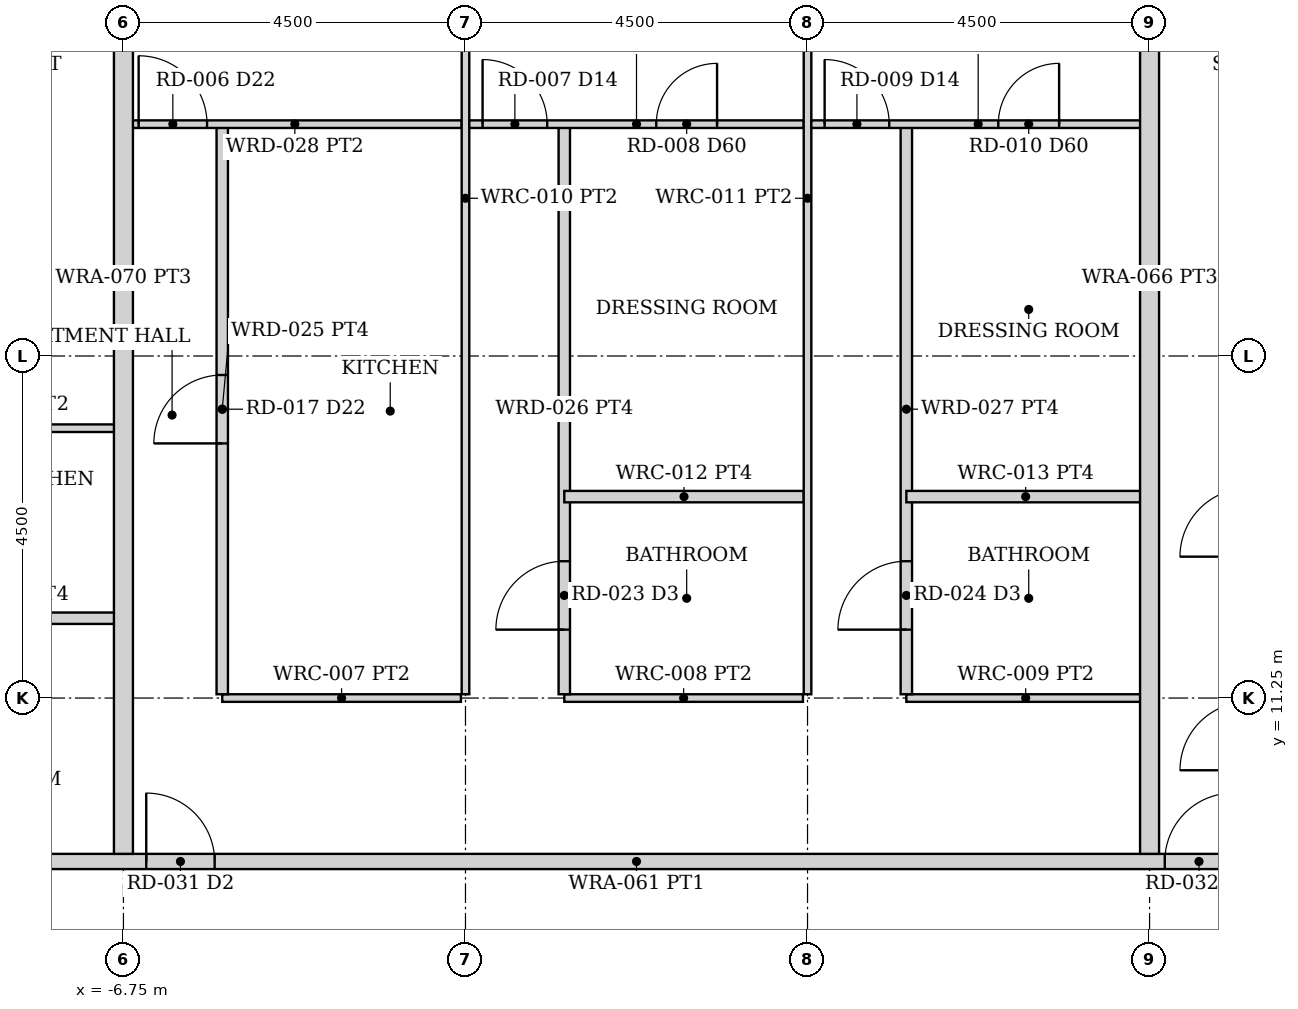
"""IFC4 building model, lengths in metres.
Left out: names, types, materials, properties, quantities, classifications, styles, units other than length and angle.
Written with IfcOpenShell. Run it as: python <this file> out.ifc"""

import sys

from ifc_helpers import new_model, si_unit, direction, frame, frame_2d, origin, place, context, subcontext, project, spatial, rectangle, extrude, element, fill, save


model = new_model("IFC4")
c1 = context("Model", 3, precision=1e-05, world=origin(), true_north=direction((0.0, 1.0)))
c2 = subcontext(c1, "Body", "Model", "MODEL_VIEW")
j1 = project(units=[si_unit("LENGTHUNIT", "METRE"), si_unit("PLANEANGLEUNIT", "RADIAN")], contexts=[c1])
p1 = place(None, origin())
s1 = spatial("IfcSite", under=j1, at=p1, CompositionType="ELEMENT")
p2 = place(p1, origin())
s2 = spatial("IfcBuilding", under=s1, at=p2, CompositionType="ELEMENT")
p3 = place(p2, frame((0.0, 0.0, 58.0)))
s3 = spatial("IfcBuildingStorey", under=s2, at=p3, CompositionType="ELEMENT", Elevation=58.0)
p4 = place(p3, frame((-24.55, 9.1, 0.0), z_axis=(0.0, 0.0, 1.0), x_axis=(1.0, 0.0, 0.0)))
e1 = element("IfcWall", 1, at=p4, inside=s3, PredefinedType="PARTITIONING", context=c2, shape_type="SweptSolid", body=[
    extrude(rectangle(XDim=49.1, YDim=0.2, at=frame_2d((24.55, 0.0))), origin(), (0.0, 0.0, 1.0), 2.373),
])
p5 = place(p4, frame((5.1, 0.0, 0.0)))
e2 = element("IfcOpeningElement", 2, at=p5, cuts=e1, PredefinedType="OPENING", context=c2, shape_type="SweptSolid", body=[
    extrude(rectangle(XDim=0.9, YDim=2.1, at=frame_2d((0.45, 1.05))), frame((0.0, 0.11, 0.0), z_axis=(0.0, -1.0, 0.0), x_axis=(1.0, 0.0, 0.0)), (0.0, 0.0, 1.0), 0.22),
])
p6 = place(p4, frame((13.5, 0.0, 0.0)))
e3 = element("IfcOpeningElement", 3, at=p6, cuts=e1, PredefinedType="OPENING", context=c2, shape_type="SweptSolid", body=[
    extrude(rectangle(XDim=0.9, YDim=2.1, at=frame_2d((0.45, 1.05))), frame((0.0, 0.11, 0.0), z_axis=(0.0, -1.0, 0.0), x_axis=(1.0, 0.0, 0.0)), (0.0, 0.0, 1.0), 0.22),
])
p7 = place(p4, frame((18.1, 0.0, 0.0)))
e4 = element("IfcOpeningElement", 4, at=p7, cuts=e1, PredefinedType="OPENING", context=c2, shape_type="SweptSolid", body=[
    extrude(rectangle(XDim=0.9, YDim=2.1, at=frame_2d((0.45, 1.05))), frame((0.0, 0.11, 0.0), z_axis=(0.0, -1.0, 0.0), x_axis=(1.0, 0.0, 0.0)), (0.0, 0.0, 1.0), 0.22),
])
p8 = place(p4, frame((31.5, 0.0, 0.0)))
e5 = element("IfcOpeningElement", 5, at=p8, cuts=e1, PredefinedType="OPENING", context=c2, shape_type="SweptSolid", body=[
    extrude(rectangle(XDim=0.9, YDim=2.1, at=frame_2d((0.45, 1.05))), frame((0.0, 0.11, 0.0), z_axis=(0.0, -1.0, 0.0), x_axis=(1.0, 0.0, 0.0)), (0.0, 0.0, 1.0), 0.22),
])
p9 = place(p4, frame((43.1, 0.0, 0.0)))
e6 = element("IfcOpeningElement", 6, at=p9, cuts=e1, PredefinedType="OPENING", context=c2, shape_type="SweptSolid", body=[
    extrude(rectangle(XDim=0.9, YDim=2.1, at=frame_2d((0.45, 1.05))), frame((0.0, 0.11, 0.0), z_axis=(0.0, -1.0, 0.0), x_axis=(1.0, 0.0, 0.0)), (0.0, 0.0, 1.0), 0.22),
])
p10 = place(p3, frame((-9.9, 12.3, 0.0), z_axis=(0.0, 0.0, 1.0), x_axis=(1.0, 0.0, 0.0)))
e7 = element("IfcWall", 7, at=p10, inside=s3, PredefinedType="PARTITIONING", context=c2, shape_type="SweptSolid", body=[
    extrude(rectangle(XDim=3.05, YDim=0.15, at=frame_2d((1.525, 0.0))), origin(), (0.0, 0.0, 1.0), 2.373),
])
p11 = place(p3, frame((-9.9, 14.8, 0.0), z_axis=(0.0, 0.0, 1.0), x_axis=(1.0, 0.0, 0.0)))
e8 = element("IfcWall", 8, at=p11, inside=s3, PredefinedType="PARTITIONING", context=c2, shape_type="SweptSolid", body=[
    extrude(rectangle(XDim=3.05, YDim=0.1, at=frame_2d((1.525, 0.0))), origin(), (0.0, 0.0, 1.0), 2.373),
])
p12 = place(p3, frame((-5.45, 11.25, 0.0), z_axis=(0.0, 0.0, 1.0), x_axis=(1.0, 0.0, 0.0)))
e9 = element("IfcWall", 9, at=p12, inside=s3, PredefinedType="PARTITIONING", context=c2, shape_type="SweptSolid", body=[
    extrude(rectangle(XDim=3.14, YDim=0.1, at=frame_2d((1.57, 0.0))), origin(), (0.0, 0.0, 1.0), 2.373),
])
p13 = place(p3, frame((-5.45, 11.3, 0.0), z_axis=(0.0, 0.0, 1.0), x_axis=(0.0, 1.0, 0.0)))
e10 = element("IfcWall", 10, at=p13, inside=s3, PredefinedType="PARTITIONING", context=c2, shape_type="SweptSolid", body=[
    extrude(rectangle(XDim=7.5, YDim=0.15, at=frame_2d((3.75, 0.0))), origin(), (0.0, 0.0, 1.0), 2.373),
])
p14 = place(p13, frame((3.3, 0.0, 0.0)))
e11 = element("IfcOpeningElement", 11, at=p14, cuts=e10, PredefinedType="OPENING", context=c2, shape_type="SweptSolid", body=[
    extrude(rectangle(XDim=0.9, YDim=2.1, at=frame_2d((0.45, 1.05))), frame((0.0, 0.085, 0.0), z_axis=(0.0, -1.0, 0.0), x_axis=(1.0, 0.0, 0.0)), (0.0, 0.0, 1.0), 0.17),
])
p15 = place(p3, frame((-6.69, 18.8, 0.0), z_axis=(0.0, 0.0, 1.0), x_axis=(1.0, 0.0, 0.0)))
e12 = element("IfcWall", 12, at=p15, inside=s3, PredefinedType="PARTITIONING", context=c2, shape_type="SweptSolid", body=[
    extrude(rectangle(XDim=4.39, YDim=0.1, at=frame_2d((2.195, 0.0))), origin(), (0.0, 0.0, 1.0), 2.373),
])
p16 = place(p15, frame((0.14, 0.0, 0.0)))
e13 = element("IfcOpeningElement", 13, at=p16, cuts=e12, PredefinedType="OPENING", context=c2, shape_type="SweptSolid", body=[
    extrude(rectangle(XDim=0.9, YDim=2.1, at=frame_2d((0.45, 1.05))), frame((0.0, 0.06, 0.0), z_axis=(0.0, -1.0, 0.0), x_axis=(1.0, 0.0, 0.0)), (0.0, 0.0, 1.0), 0.12),
])
p17 = place(p3, frame((-2.25, 11.3, 0.0), z_axis=(0.0, 0.0, 1.0), x_axis=(0.0, 1.0, 0.0)))
e14 = element("IfcWall", 14, at=p17, inside=s3, PredefinedType="PARTITIONING", context=c2, shape_type="SweptSolid", body=[
    extrude(rectangle(XDim=13.05, YDim=0.1, at=frame_2d((6.525, 0.0))), origin(), (0.0, 0.0, 1.0), 2.373),
])
p18 = place(p3, frame((-0.95, 11.25, 0.0), z_axis=(0.0, 0.0, 1.0), x_axis=(1.0, 0.0, 0.0)))
e15 = element("IfcWall", 15, at=p18, inside=s3, PredefinedType="PARTITIONING", context=c2, shape_type="SweptSolid", body=[
    extrude(rectangle(XDim=3.14, YDim=0.1, at=frame_2d((1.57, 0.0))), origin(), (0.0, 0.0, 1.0), 2.373),
])
p19 = place(p3, frame((-0.95, 11.3, 0.0), z_axis=(0.0, 0.0, 1.0), x_axis=(0.0, 1.0, 0.0)))
e16 = element("IfcWall", 16, at=p19, inside=s3, PredefinedType="PARTITIONING", context=c2, shape_type="SweptSolid", body=[
    extrude(rectangle(XDim=7.5, YDim=0.15, at=frame_2d((3.75, 0.0))), origin(), (0.0, 0.0, 1.0), 2.373),
])
p20 = place(p19, frame((0.85, 0.0, 0.0)))
e17 = element("IfcOpeningElement", 17, at=p20, cuts=e16, PredefinedType="OPENING", context=c2, shape_type="SweptSolid", body=[
    extrude(rectangle(XDim=0.9, YDim=2.1, at=frame_2d((0.45, 1.05))), frame((0.0, 0.085, 0.0), z_axis=(0.0, -1.0, 0.0), x_axis=(1.0, 0.0, 0.0)), (0.0, 0.0, 1.0), 0.17),
])
p21 = place(p3, frame((-2.2, 18.8, 0.0), z_axis=(0.0, 0.0, 1.0), x_axis=(1.0, 0.0, 0.0)))
e18 = element("IfcWall", 18, at=p21, inside=s3, PredefinedType="PARTITIONING", context=c2, shape_type="SweptSolid", body=[
    extrude(rectangle(XDim=4.4, YDim=0.1, at=frame_2d((2.2, 0.0))), origin(), (0.0, 0.0, 1.0), 2.373),
])
p22 = place(p21, frame((0.175, 0.0, 0.0)))
e19 = element("IfcOpeningElement", 19, at=p22, cuts=e18, PredefinedType="OPENING", context=c2, shape_type="SweptSolid", body=[
    extrude(rectangle(XDim=0.85, YDim=2.1, at=frame_2d((0.425, 1.05))), frame((0.0, 0.06, 0.0), z_axis=(0.0, -1.0, 0.0), x_axis=(1.0, 0.0, 0.0)), (0.0, 0.0, 1.0), 0.12),
])
p23 = place(p21, frame((2.46, 0.0, 0.0)))
e20 = element("IfcOpeningElement", 20, at=p23, cuts=e18, PredefinedType="OPENING", context=c2, shape_type="SweptSolid", body=[
    extrude(rectangle(XDim=0.8, YDim=2.1, at=frame_2d((0.4, 1.05))), frame((0.0, 0.06, 0.0), z_axis=(0.0, -1.0, 0.0), x_axis=(1.0, 0.0, 0.0)), (0.0, 0.0, 1.0), 0.12),
])
p24 = place(p3, frame((-0.95, 13.9, 0.0), z_axis=(0.0, 0.0, 1.0), x_axis=(1.0, 0.0, 0.0)))
e21 = element("IfcWall", 21, at=p24, inside=s3, PredefinedType="PARTITIONING", context=c2, shape_type="SweptSolid", body=[
    extrude(rectangle(XDim=3.15, YDim=0.15, at=frame_2d((1.575, 0.0))), origin(), (0.0, 0.0, 1.0), 2.373),
])
p25 = place(p3, frame((2.25, 11.3, 0.0), z_axis=(0.0, 0.0, 1.0), x_axis=(0.0, 1.0, 0.0)))
e22 = element("IfcWall", 22, at=p25, inside=s3, PredefinedType="PARTITIONING", context=c2, shape_type="SweptSolid", body=[
    extrude(rectangle(XDim=13.05, YDim=0.1, at=frame_2d((6.525, 0.0))), origin(), (0.0, 0.0, 1.0), 2.373),
])
p26 = place(p3, frame((3.55, 11.25, 0.0), z_axis=(0.0, 0.0, 1.0), x_axis=(1.0, 0.0, 0.0)))
e23 = element("IfcWall", 23, at=p26, inside=s3, PredefinedType="PARTITIONING", context=c2, shape_type="SweptSolid", body=[
    extrude(rectangle(XDim=3.14, YDim=0.1, at=frame_2d((1.57, 0.0))), origin(), (0.0, 0.0, 1.0), 2.373),
])
p27 = place(p3, frame((3.55, 11.3, 0.0), z_axis=(0.0, 0.0, 1.0), x_axis=(0.0, 1.0, 0.0)))
e24 = element("IfcWall", 24, at=p27, inside=s3, PredefinedType="PARTITIONING", context=c2, shape_type="SweptSolid", body=[
    extrude(rectangle(XDim=7.5, YDim=0.15, at=frame_2d((3.75, 0.0))), origin(), (0.0, 0.0, 1.0), 2.373),
])
p28 = place(p27, frame((0.85, 0.0, 0.0)))
e25 = element("IfcOpeningElement", 25, at=p28, cuts=e24, PredefinedType="OPENING", context=c2, shape_type="SweptSolid", body=[
    extrude(rectangle(XDim=0.9, YDim=2.1, at=frame_2d((0.45, 1.05))), frame((0.0, 0.085, 0.0), z_axis=(0.0, -1.0, 0.0), x_axis=(1.0, 0.0, 0.0)), (0.0, 0.0, 1.0), 0.17),
])
p29 = place(p3, frame((2.3, 18.8, 0.0), z_axis=(0.0, 0.0, 1.0), x_axis=(1.0, 0.0, 0.0)))
e26 = element("IfcWall", 26, at=p29, inside=s3, PredefinedType="PARTITIONING", context=c2, shape_type="SweptSolid", body=[
    extrude(rectangle(XDim=4.39, YDim=0.1, at=frame_2d((2.195, 0.0))), origin(), (0.0, 0.0, 1.0), 2.373),
])
p30 = place(p29, frame((0.175, 0.0, 0.0)))
e27 = element("IfcOpeningElement", 27, at=p30, cuts=e26, PredefinedType="OPENING", context=c2, shape_type="SweptSolid", body=[
    extrude(rectangle(XDim=0.85, YDim=2.1, at=frame_2d((0.425, 1.05))), frame((0.0, 0.06, 0.0), z_axis=(0.0, -1.0, 0.0), x_axis=(1.0, 0.0, 0.0)), (0.0, 0.0, 1.0), 0.12),
])
p31 = place(p29, frame((2.46, 0.0, 0.0)))
e28 = element("IfcOpeningElement", 28, at=p31, cuts=e26, PredefinedType="OPENING", context=c2, shape_type="SweptSolid", body=[
    extrude(rectangle(XDim=0.8, YDim=2.1, at=frame_2d((0.4, 1.05))), frame((0.0, 0.06, 0.0), z_axis=(0.0, -1.0, 0.0), x_axis=(1.0, 0.0, 0.0)), (0.0, 0.0, 1.0), 0.12),
])
p32 = place(p3, frame((3.55, 13.9, 0.0), z_axis=(0.0, 0.0, 1.0), x_axis=(1.0, 0.0, 0.0)))
e29 = element("IfcWall", 29, at=p32, inside=s3, PredefinedType="PARTITIONING", context=c2, shape_type="SweptSolid", body=[
    extrude(rectangle(XDim=3.14, YDim=0.15, at=frame_2d((1.57, 0.0))), origin(), (0.0, 0.0, 1.0), 2.373),
])
for number, where, z_axis, x_axis in (
    (30, (-6.75, 9.2, 0.0), (0.0, 0.0, 1.0), (0.0, 1.0, 0.0)),
    (31, (6.75, 9.2, 0.0), (0.0, 0.0, 1.0), (0.0, 1.0, 0.0)),
):
    element("IfcWall", number, at=place(p3, frame(where, z_axis=z_axis, x_axis=x_axis)), inside=s3, PredefinedType="PARTITIONING", context=c2, shape_type="SweptSolid", body=[
        extrude(rectangle(XDim=15.15, YDim=0.25, at=frame_2d((7.575, 0.0))), origin(), (0.0, 0.0, 1.0), 2.373),
    ])
p33 = place(p7, origin())
e32 = element("IfcDoor", 32, at=p33, inside=s3, OperationType="SINGLE_SWING_LEFT", PredefinedType="DOOR", context=c2, shape_type="SweptSolid", body=[
    extrude(rectangle(XDim=0.9, YDim=2.1, at=frame_2d((0.45, 1.05))), frame((0.0, 0.025, 0.0), z_axis=(0.0, -1.0, 0.0), x_axis=(1.0, 0.0, 0.0)), (0.0, 0.0, 1.0), 0.05),
])
fill(e4, e32)
p34 = place(p14, origin())
e33 = element("IfcDoor", 33, at=p34, inside=s3, OperationType="SINGLE_SWING_LEFT", PredefinedType="DOOR", context=c2, shape_type="SweptSolid", body=[
    extrude(rectangle(XDim=0.9, YDim=2.1, at=frame_2d((0.45, 1.05))), frame((0.0, 0.025, 0.0), z_axis=(0.0, -1.0, 0.0), x_axis=(1.0, 0.0, 0.0)), (0.0, 0.0, 1.0), 0.05),
])
fill(e11, e33)
p35 = place(p16, origin())
e34 = element("IfcDoor", 34, at=p35, inside=s3, OperationType="SINGLE_SWING_LEFT", PredefinedType="DOOR", context=c2, shape_type="SweptSolid", body=[
    extrude(rectangle(XDim=0.9, YDim=2.1, at=frame_2d((0.45, 1.05))), frame((0.0, 0.025, 0.0), z_axis=(0.0, -1.0, 0.0), x_axis=(1.0, 0.0, 0.0)), (0.0, 0.0, 1.0), 0.05),
])
fill(e13, e34)
p36 = place(p22, origin())
e35 = element("IfcDoor", 35, at=p36, inside=s3, OperationType="SINGLE_SWING_LEFT", PredefinedType="DOOR", context=c2, shape_type="SweptSolid", body=[
    extrude(rectangle(XDim=0.85, YDim=2.1, at=frame_2d((0.425, 1.05))), frame((0.0, 0.025, 0.0), z_axis=(0.0, -1.0, 0.0), x_axis=(1.0, 0.0, 0.0)), (0.0, 0.0, 1.0), 0.05),
])
fill(e19, e35)
p37 = place(p20, origin())
e36 = element("IfcDoor", 36, at=p37, inside=s3, OperationType="SINGLE_SWING_LEFT", PredefinedType="DOOR", context=c2, shape_type="SweptSolid", body=[
    extrude(rectangle(XDim=0.9, YDim=2.1, at=frame_2d((0.45, 1.05))), frame((0.0, 0.025, 0.0), z_axis=(0.0, -1.0, 0.0), x_axis=(1.0, 0.0, 0.0)), (0.0, 0.0, 1.0), 0.05),
])
fill(e17, e36)
p38 = place(p23, origin())
e37 = element("IfcDoor", 37, at=p38, inside=s3, OperationType="SINGLE_SWING_RIGHT", PredefinedType="DOOR", context=c2, shape_type="SweptSolid", body=[
    extrude(rectangle(XDim=0.8, YDim=2.1, at=frame_2d((0.4, 1.05))), frame((0.0, 0.025, 0.0), z_axis=(0.0, -1.0, 0.0), x_axis=(1.0, 0.0, 0.0)), (0.0, 0.0, 1.0), 0.05),
])
fill(e20, e37)
p39 = place(p30, origin())
e38 = element("IfcDoor", 38, at=p39, inside=s3, OperationType="SINGLE_SWING_LEFT", PredefinedType="DOOR", context=c2, shape_type="SweptSolid", body=[
    extrude(rectangle(XDim=0.85, YDim=2.1, at=frame_2d((0.425, 1.05))), frame((0.0, 0.025, 0.0), z_axis=(0.0, -1.0, 0.0), x_axis=(1.0, 0.0, 0.0)), (0.0, 0.0, 1.0), 0.05),
])
fill(e27, e38)
p40 = place(p28, origin())
e39 = element("IfcDoor", 39, at=p40, inside=s3, OperationType="SINGLE_SWING_LEFT", PredefinedType="DOOR", context=c2, shape_type="SweptSolid", body=[
    extrude(rectangle(XDim=0.9, YDim=2.1, at=frame_2d((0.45, 1.05))), frame((0.0, 0.025, 0.0), z_axis=(0.0, -1.0, 0.0), x_axis=(1.0, 0.0, 0.0)), (0.0, 0.0, 1.0), 0.05),
])
fill(e25, e39)
p41 = place(p31, origin())
e40 = element("IfcDoor", 40, at=p41, inside=s3, OperationType="SINGLE_SWING_RIGHT", PredefinedType="DOOR", context=c2, shape_type="SweptSolid", body=[
    extrude(rectangle(XDim=0.8, YDim=2.1, at=frame_2d((0.4, 1.05))), frame((0.0, 0.025, 0.0), z_axis=(0.0, -1.0, 0.0), x_axis=(1.0, 0.0, 0.0)), (0.0, 0.0, 1.0), 0.05),
])
fill(e28, e40)
p42 = place(p8, origin())
e41 = element("IfcDoor", 41, at=p42, inside=s3, OperationType="SINGLE_SWING_RIGHT", PredefinedType="DOOR", context=c2, shape_type="SweptSolid", body=[
    extrude(rectangle(XDim=0.9, YDim=2.1, at=frame_2d((0.45, 1.05))), frame((0.0, 0.025, 0.0), z_axis=(0.0, -1.0, 0.0), x_axis=(1.0, 0.0, 0.0)), (0.0, 0.0, 1.0), 0.05),
])
fill(e5, e41)
save(model, sys.argv[1])
